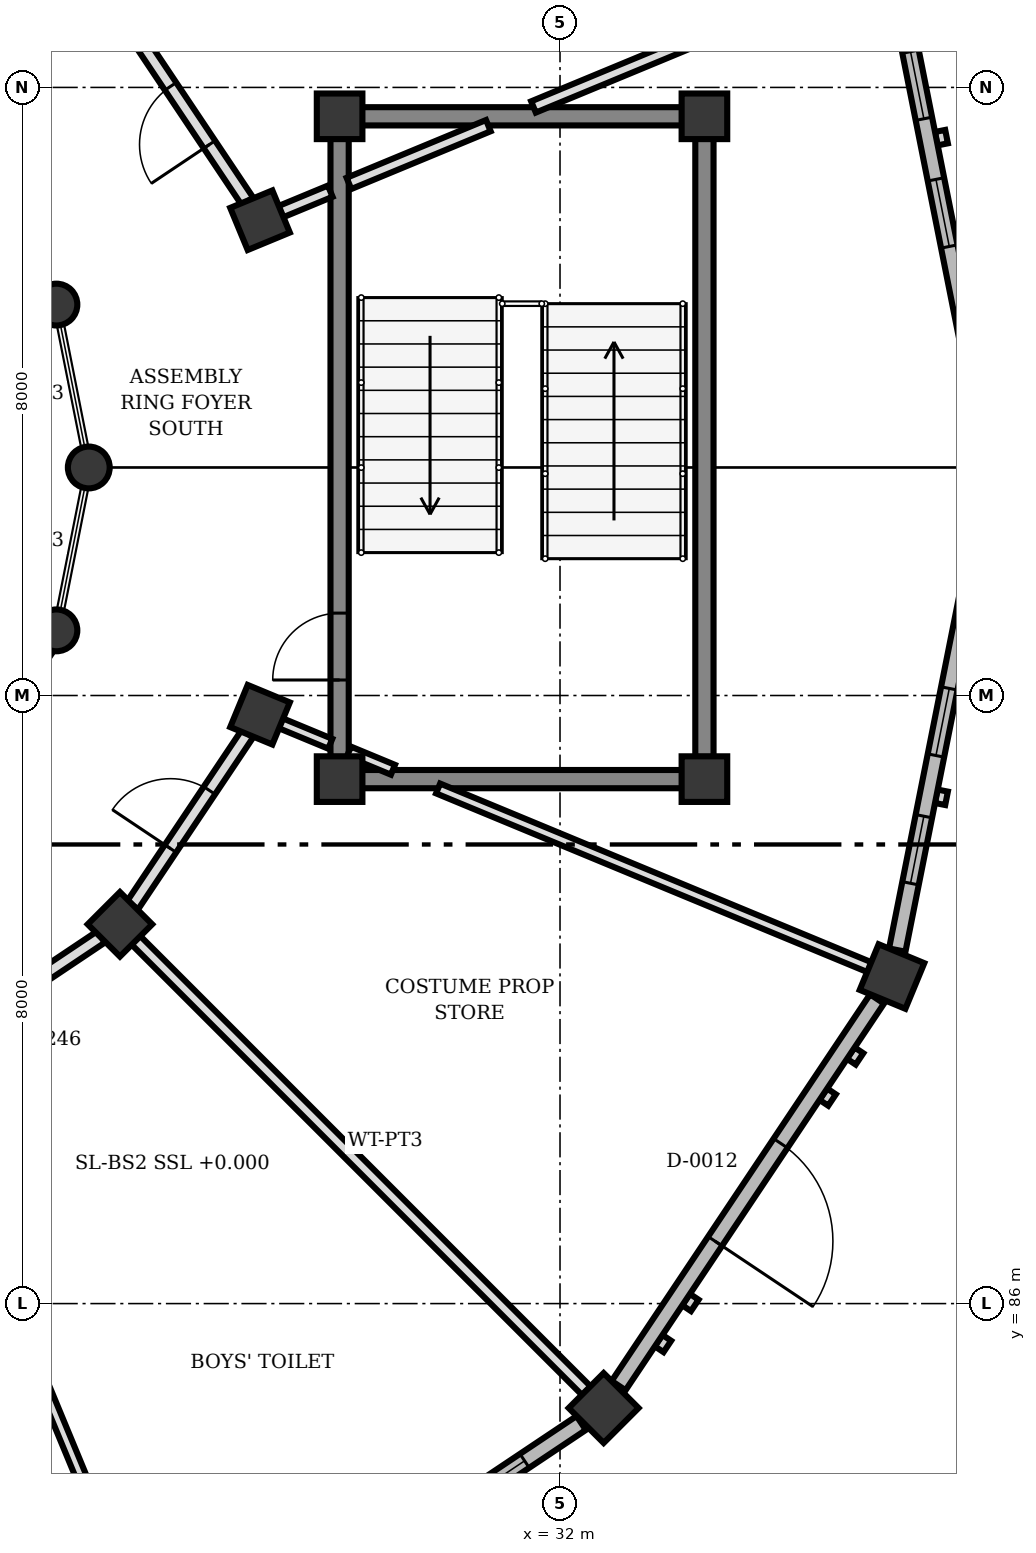
"""IFC4 building model, lengths in metres.
Left out: names, types, materials, properties, quantities, classifications, styles, units other than length and angle.
Written with IfcOpenShell. Run it as: python <this file> out.ifc"""

import sys

from ifc_helpers import new_model, si_unit, direction, frame, frame_2d, origin, origin_2d, place, context, subcontext, project, spatial, rectangle, circle, extrude, element, fill, save


model = new_model("IFC4")
c1 = context("Model", 3, precision=1e-05, world=origin(), true_north=direction((0.0, 1.0)))
c2 = subcontext(c1, "Body", "Model", "MODEL_VIEW")
j1 = project(units=[si_unit("LENGTHUNIT", "METRE"), si_unit("PLANEANGLEUNIT", "RADIAN")], contexts=[c1])
p1 = place(None, origin())
s1 = spatial("IfcSite", under=j1, at=p1, CompositionType="ELEMENT")
p2 = place(p1, origin())
s2 = spatial("IfcBuilding", under=s1, at=p2, CompositionType="ELEMENT")
p3 = place(p2, origin())
s3 = spatial("IfcBuildingStorey", under=s2, at=p3, CompositionType="ELEMENT", Elevation=0.0)
for number, where, z_axis, x_axis in (
    (1, (29.1, 92.9, 0.0), (0.0, 0.0, 1.0), (1.0, 0.0, 0.0)),
    (2, (33.9, 92.9, 0.0), (0.0, 0.0, 1.0), (1.0, 0.0, 0.0)),
    (3, (33.9, 101.62, 0.0), (0.0, 0.0, 1.0), (1.0, 0.0, 0.0)),
    (4, (29.1, 101.62, 0.0), (0.0, 0.0, 1.0), (1.0, 0.0, 0.0)),
):
    element("IfcColumn", number, at=place(p3, frame(where, z_axis=z_axis, x_axis=x_axis)), inside=s3, PredefinedType="COLUMN", context=c2, shape_type="SweptSolid", body=[
        extrude(rectangle(XDim=0.6, YDim=0.6, at=origin_2d()), origin(), (0.0, 0.0, 1.0), 4.5),
    ])
for number, where, z_axis, x_axis in (
    (5, (25.8, 97.0, 0.0), (0.0, 0.0, 1.0), (1.0, 0.0, 0.0)),
    (6, (25.374, 99.143, 0.0), (0.0, 0.0, 1.0), (1.0, 0.0, 0.0)),
    (7, (25.374, 94.857, 0.0), (0.0, 0.0, 1.0), (1.0, 0.0, 0.0)),
):
    element("IfcColumn", number, at=place(p3, frame(where, z_axis=z_axis, x_axis=x_axis)), inside=s3, PredefinedType="COLUMN", context=c2, shape_type="SweptSolid", body=[
        extrude(circle(Radius=0.275, at=origin_2d()), origin(), (0.0, 0.0, 1.0), 4.5),
    ])
for number, where, z_axis, x_axis in (
    (8, (28.053, 100.253, 0.0), (0.0, 0.0, 1.0), (0.924, 0.383, 0.0)),
    (9, (26.21, 90.99, 0.0), (0.0, 0.0, 1.0), (0.707, -0.707, 0.0)),
    (10, (28.053, 93.747, 0.0), (0.0, 0.0, 1.0), (0.924, -0.383, 0.0)),
):
    element("IfcColumn", number, at=place(p3, frame(where, z_axis=z_axis, x_axis=x_axis)), inside=s3, PredefinedType="COLUMN", context=c2, shape_type="SweptSolid", body=[
        extrude(rectangle(XDim=0.6, YDim=0.6, at=origin_2d()), origin(), (0.0, 0.0, 1.0), 4.5),
    ])
for number, where, z_axis, x_axis in (
    (11, (32.574, 84.626, 0.0), (0.0, 0.0, 1.0), (0.707, -0.707, 0.0)),
    (12, (36.368, 90.303, 0.0), (0.0, 0.0, 1.0), (0.924, -0.383, 0.0)),
):
    element("IfcColumn", number, at=place(p3, frame(where, z_axis=z_axis, x_axis=x_axis)), inside=s3, PredefinedType="COLUMN", context=c2, shape_type="SweptSolid", body=[
        extrude(rectangle(XDim=0.65, YDim=0.65, at=origin_2d()), origin(), (0.0, 0.0, 1.0), 4.5),
    ])
p4 = place(p3, frame((36.437, 103.349, 0.0), z_axis=(0.0, 0.0, 1.0), x_axis=(0.195149240347, -0.980773558979, 0.0)))
e13 = element("IfcWall", 13, at=p4, inside=s3, PredefinedType="SOLIDWALL", context=c2, shape_type="SweptSolid", body=[
    extrude(rectangle(XDim=6.119, YDim=0.22, at=frame_2d((3.06, 0.0))), origin(), (0.0, 0.0, 1.0), 3.55),
])
p5 = place(p4, frame((0.896, 0.0, 0.85)))
e14 = element("IfcOpeningElement", 14, at=p5, cuts=e13, PredefinedType="OPENING", context=c2, shape_type="SweptSolid", body=[
    extrude(rectangle(XDim=0.9, YDim=1.4, at=frame_2d((0.45, 0.7))), frame((0.0, 0.12, 0.0), z_axis=(0.0, -1.0, 0.0), x_axis=(1.0, 0.0, 0.0)), (0.0, 0.0, 1.0), 0.24),
])
p6 = place(p4, frame((2.609, 0.0, 0.85)))
e15 = element("IfcOpeningElement", 15, at=p6, cuts=e13, PredefinedType="OPENING", context=c2, shape_type="SweptSolid", body=[
    extrude(rectangle(XDim=0.9, YDim=1.4, at=frame_2d((0.45, 0.7))), frame((0.0, 0.12, 0.0), z_axis=(0.0, -1.0, 0.0), x_axis=(1.0, 0.0, 0.0)), (0.0, 0.0, 1.0), 0.24),
])
p7 = place(p4, frame((4.323, 0.0, 0.85)))
e16 = element("IfcOpeningElement", 16, at=p7, cuts=e13, PredefinedType="OPENING", context=c2, shape_type="SweptSolid", body=[
    extrude(rectangle(XDim=0.9, YDim=1.4, at=frame_2d((0.45, 0.7))), frame((0.0, 0.12, 0.0), z_axis=(0.0, -1.0, 0.0), x_axis=(1.0, 0.0, 0.0)), (0.0, 0.0, 1.0), 0.24),
])
p8 = place(p3, frame((32.279, 84.429, 0.0), z_axis=(0.0, 0.0, 1.0), x_axis=(-0.831411331728, -0.555657446161, 0.0)))
e17 = element("IfcWall", 17, at=p8, inside=s3, PredefinedType="SOLIDWALL", context=c2, shape_type="SweptSolid", body=[
    extrude(rectangle(XDim=6.119, YDim=0.22, at=frame_2d((3.059, 0.0))), origin(), (0.0, 0.0, 1.0), 3.55),
])
p9 = place(p8, frame((0.896, 0.0, 0.85)))
e18 = element("IfcOpeningElement", 18, at=p9, cuts=e17, PredefinedType="OPENING", context=c2, shape_type="SweptSolid", body=[
    extrude(rectangle(XDim=0.9, YDim=1.4, at=frame_2d((0.45, 0.7))), frame((0.0, 0.12, 0.0), z_axis=(0.0, -1.0, 0.0), x_axis=(1.0, 0.0, 0.0)), (0.0, 0.0, 1.0), 0.24),
])
p10 = place(p8, frame((2.609, 0.0, 0.85)))
e19 = element("IfcOpeningElement", 19, at=p10, cuts=e17, PredefinedType="OPENING", context=c2, shape_type="SweptSolid", body=[
    extrude(rectangle(XDim=0.9, YDim=1.4, at=frame_2d((0.45, 0.7))), frame((0.0, 0.12, 0.0), z_axis=(0.0, -1.0, 0.0), x_axis=(1.0, 0.0, 0.0)), (0.0, 0.0, 1.0), 0.24),
])
p11 = place(p8, frame((4.323, 0.0, 0.85)))
e20 = element("IfcOpeningElement", 20, at=p11, cuts=e17, PredefinedType="OPENING", context=c2, shape_type="SweptSolid", body=[
    extrude(rectangle(XDim=0.9, YDim=1.4, at=frame_2d((0.45, 0.7))), frame((0.0, 0.12, 0.0), z_axis=(0.0, -1.0, 0.0), x_axis=(1.0, 0.0, 0.0)), (0.0, 0.0, 1.0), 0.24),
])
p12 = place(p3, frame((36.171, 90.008, 0.0), z_axis=(0.0, 0.0, 1.0), x_axis=(-0.555657446161, -0.831411331728, 0.0)))
e21 = element("IfcWall", 21, at=p12, inside=s3, PredefinedType="SOLIDWALL", context=c2, shape_type="SweptSolid", body=[
    extrude(rectangle(XDim=6.119, YDim=0.22, at=frame_2d((3.059, 0.0))), origin(), (0.0, 0.0, 1.0), 3.55),
])
p13 = place(p12, frame((2.284, 0.0, 0.0)))
e22 = element("IfcOpeningElement", 22, at=p13, cuts=e21, PredefinedType="OPENING", context=c2, shape_type="SweptSolid", body=[
    extrude(rectangle(XDim=1.55, YDim=2.2, at=frame_2d((0.775, 1.1))), frame((0.0, 0.12, 0.0), z_axis=(0.0, -1.0, 0.0), x_axis=(1.0, 0.0, 0.0)), (0.0, 0.0, 1.0), 0.24),
])
p14 = place(p3, frame((37.631, 96.652, 0.0), z_axis=(0.0, 0.0, 1.0), x_axis=(-0.195149240347, -0.980773558979, 0.0)))
e23 = element("IfcWall", 23, at=p14, inside=s3, PredefinedType="SOLIDWALL", context=c2, shape_type="SweptSolid", body=[
    extrude(rectangle(XDim=6.119, YDim=0.22, at=frame_2d((3.06, 0.0))), origin(), (0.0, 0.0, 1.0), 3.55),
])
p15 = place(p14, frame((0.896, 0.0, 0.85)))
e24 = element("IfcOpeningElement", 24, at=p15, cuts=e23, PredefinedType="OPENING", context=c2, shape_type="SweptSolid", body=[
    extrude(rectangle(XDim=0.9, YDim=1.4, at=frame_2d((0.45, 0.7))), frame((0.0, 0.12, 0.0), z_axis=(0.0, -1.0, 0.0), x_axis=(1.0, 0.0, 0.0)), (0.0, 0.0, 1.0), 0.24),
])
p16 = place(p14, frame((2.609, 0.0, 0.85)))
e25 = element("IfcOpeningElement", 25, at=p16, cuts=e23, PredefinedType="OPENING", context=c2, shape_type="SweptSolid", body=[
    extrude(rectangle(XDim=0.9, YDim=1.4, at=frame_2d((0.45, 0.7))), frame((0.0, 0.12, 0.0), z_axis=(0.0, -1.0, 0.0), x_axis=(1.0, 0.0, 0.0)), (0.0, 0.0, 1.0), 0.24),
])
p17 = place(p14, frame((4.323, 0.0, 0.85)))
e26 = element("IfcOpeningElement", 26, at=p17, cuts=e23, PredefinedType="OPENING", context=c2, shape_type="SweptSolid", body=[
    extrude(rectangle(XDim=0.9, YDim=1.4, at=frame_2d((0.45, 0.7))), frame((0.0, 0.12, 0.0), z_axis=(0.0, -1.0, 0.0), x_axis=(1.0, 0.0, 0.0)), (0.0, 0.0, 1.0), 0.24),
])
p18 = place(p3, frame((29.1, 93.192, 0.0), z_axis=(0.0, 0.0, 1.0), x_axis=(0.0, 1.0, 0.0)))
e27 = element("IfcWall", 27, at=p18, inside=s3, PredefinedType="SHEAR", context=c2, shape_type="SweptSolid", body=[
    extrude(rectangle(XDim=8.136, YDim=0.24, at=frame_2d((4.068, 0.0))), origin(), (0.0, 0.0, 1.0), 4.24),
])
p19 = place(p18, frame((1.012, 0.0, 0.0)))
e28 = element("IfcOpeningElement", 28, at=p19, cuts=e27, PredefinedType="OPENING", context=c2, shape_type="SweptSolid", body=[
    extrude(rectangle(XDim=0.88, YDim=2.1, at=frame_2d((0.44, 1.05))), frame((0.0, 0.13, 0.0), z_axis=(0.0, -1.0, 0.0), x_axis=(1.0, 0.0, 0.0)), (0.0, 0.0, 1.0), 0.26),
])
p20 = place(p3, frame((33.9, 101.328, 0.0), z_axis=(0.0, 0.0, 1.0), x_axis=(0.0, -1.0, 0.0)))
e29 = element("IfcWall", 29, at=p20, inside=s3, PredefinedType="SHEAR", context=c2, shape_type="SweptSolid", body=[
    extrude(rectangle(XDim=8.136, YDim=0.24, at=frame_2d((4.068, 0.0))), origin(), (0.0, 0.0, 1.0), 4.24),
])
for number, where, z_axis, x_axis in (
    (30, (33.608, 92.9, 0.0), (0.0, 0.0, 1.0), (-1.0, 0.0, 0.0)),
    (31, (33.608, 101.62, 0.0), (0.0, 0.0, 1.0), (-1.0, 0.0, 0.0)),
):
    element("IfcWall", number, at=place(p3, frame(where, z_axis=z_axis, x_axis=x_axis)), inside=s3, PredefinedType="SHEAR", context=c2, shape_type="SweptSolid", body=[
        extrude(rectangle(XDim=4.216, YDim=0.24, at=frame_2d((2.108, 0.0))), origin(), (0.0, 0.0, 1.0), 4.24),
    ])
p21 = place(p3, frame((28.323, 100.364, 0.0), z_axis=(0.0, 0.0, 1.0), x_axis=(0.923840285319, 0.382778169729, 0.0)))
e32 = element("IfcWall", 32, at=p21, inside=s3, PredefinedType="PARTITIONING", context=c2, shape_type="SweptSolid", body=[
    extrude(rectangle(XDim=0.708, YDim=0.16, at=frame_2d((0.354, 0.0))), origin(), (0.0, 0.0, 1.0), 4.2),
])
p22 = place(p3, frame((29.223, 100.737, 0.0), z_axis=(0.0, 0.0, 1.0), x_axis=(0.923817443679, 0.382833293686, 0.0)))
e33 = element("IfcWall", 33, at=p22, inside=s3, PredefinedType="PARTITIONING", context=c2, shape_type="SweptSolid", body=[
    extrude(rectangle(XDim=1.985, YDim=0.16, at=frame_2d((0.993, 0.0))), origin(), (0.0, 0.0, 1.0), 4.2),
])
p23 = place(p3, frame((31.651, 101.743, 0.0), z_axis=(0.0, 0.0, 1.0), x_axis=(0.923842829076, 0.38277203028, 0.0)))
e34 = element("IfcWall", 34, at=p23, inside=s3, PredefinedType="PARTITIONING", context=c2, shape_type="SweptSolid", body=[
    extrude(rectangle(XDim=4.789, YDim=0.16, at=frame_2d((2.395, 0.0))), origin(), (0.0, 0.0, 1.0), 4.2),
])
p24 = place(p3, frame((24.303, 87.094, 0.0), z_axis=(0.0, 0.0, 1.0), x_axis=(0.382744474407, -0.923854245707, 0.0)))
e35 = element("IfcWall", 35, at=p24, inside=s3, PredefinedType="PARTITIONING", context=c2, shape_type="SweptSolid", body=[
    extrude(rectangle(XDim=6.461, YDim=0.14, at=frame_2d((3.23, 0.0))), origin(), (0.0, 0.0, 1.0), 3.552),
])
p25 = place(p3, frame((26.416, 90.784, 0.0), z_axis=(0.0, 0.0, 1.0), x_axis=(0.707121327267, -0.707092234807, 0.0)))
e36 = element("IfcWall", 36, at=p25, inside=s3, PredefinedType="PARTITIONING", context=c2, shape_type="SweptSolid", body=[
    extrude(rectangle(XDim=8.392, YDim=0.16, at=frame_2d((4.196, 0.0))), origin(), (0.0, 0.0, 1.0), 3.552),
])
p26 = place(p3, frame((28.323, 93.636, 0.0), z_axis=(0.0, 0.0, 1.0), x_axis=(0.923840285319, -0.382778169729, 0.0)))
e37 = element("IfcWall", 37, at=p26, inside=s3, PredefinedType="PARTITIONING", context=c2, shape_type="SweptSolid", body=[
    extrude(rectangle(XDim=0.708, YDim=0.14, at=frame_2d((0.354, 0.0))), origin(), (0.0, 0.0, 1.0), 3.552),
])
p27 = place(p3, frame((29.223, 93.263, 0.0), z_axis=(0.0, 0.0, 1.0), x_axis=(0.923812676193, -0.382844797933, 0.0)))
e38 = element("IfcWall", 38, at=p27, inside=s3, PredefinedType="PARTITIONING", context=c2, shape_type="SweptSolid", body=[
    extrude(rectangle(XDim=0.627, YDim=0.14, at=frame_2d((0.313, 0.0))), origin(), (0.0, 0.0, 1.0), 3.552),
])
p28 = place(p3, frame((30.396, 92.777, 0.0), z_axis=(0.0, 0.0, 1.0), x_axis=(0.923837705987, -0.382784394923, 0.0)))
e39 = element("IfcWall", 39, at=p28, inside=s3, PredefinedType="PARTITIONING", context=c2, shape_type="SweptSolid", body=[
    extrude(rectangle(XDim=6.147, YDim=0.14, at=frame_2d((3.074, 0.0))), origin(), (0.0, 0.0, 1.0), 3.552),
])
p29 = place(p3, frame((27.888, 100.501, 0.0), z_axis=(0.0, 0.0, 1.0), x_axis=(-0.556128339679, 0.831096426298, 0.0)))
e40 = element("IfcWall", 40, at=p29, inside=s3, PredefinedType="PARTITIONING", context=c2, shape_type="SweptSolid", body=[
    extrude(rectangle(XDim=2.72, YDim=0.18, at=frame_2d((1.36, 0.0))), origin(), (0.0, 0.0, 1.0), 3.552),
])
p30 = place(p29, frame((0.9, 0.0, 0.0)))
e41 = element("IfcOpeningElement", 41, at=p30, cuts=e40, PredefinedType="OPENING", context=c2, shape_type="SweptSolid", body=[
    extrude(rectangle(XDim=0.92, YDim=2.1, at=frame_2d((0.46, 1.05))), frame((0.0, 0.1, 0.0), z_axis=(0.0, -1.0, 0.0), x_axis=(1.0, 0.0, 0.0)), (0.0, 0.0, 1.0), 0.2),
])
p31 = place(p3, frame((23.701, 89.312, 0.0), z_axis=(0.0, 0.0, 1.0), x_axis=(0.831096426298, 0.556128339679, 0.0)))
e42 = element("IfcWall", 42, at=p31, inside=s3, PredefinedType="PARTITIONING", context=c2, shape_type="SweptSolid", body=[
    extrude(rectangle(XDim=2.72, YDim=0.18, at=frame_2d((1.36, 0.0))), origin(), (0.0, 0.0, 1.0), 3.552),
])
p32 = place(p31, frame((0.9, 0.0, 0.0)))
e43 = element("IfcOpeningElement", 43, at=p32, cuts=e42, PredefinedType="OPENING", context=c2, shape_type="SweptSolid", body=[
    extrude(rectangle(XDim=0.92, YDim=2.1, at=frame_2d((0.46, 1.05))), frame((0.0, 0.1, 0.0), z_axis=(0.0, -1.0, 0.0), x_axis=(1.0, 0.0, 0.0)), (0.0, 0.0, 1.0), 0.2),
])
p33 = place(p3, frame((26.375, 91.238, 0.0), z_axis=(0.0, 0.0, 1.0), x_axis=(0.556128339679, 0.831096426298, 0.0)))
e44 = element("IfcWall", 44, at=p33, inside=s3, PredefinedType="PARTITIONING", context=c2, shape_type="SweptSolid", body=[
    extrude(rectangle(XDim=2.72, YDim=0.18, at=frame_2d((1.36, 0.0))), origin(), (0.0, 0.0, 1.0), 3.552),
])
p34 = place(p33, frame((0.9, 0.0, 0.0)))
e45 = element("IfcOpeningElement", 45, at=p34, cuts=e44, PredefinedType="OPENING", context=c2, shape_type="SweptSolid", body=[
    extrude(rectangle(XDim=0.92, YDim=2.1, at=frame_2d((0.46, 1.05))), frame((0.0, 0.1, 0.0), z_axis=(0.0, -1.0, 0.0), x_axis=(1.0, 0.0, 0.0)), (0.0, 0.0, 1.0), 0.2),
])
p35 = place(p5, origin())
e46 = element("IfcWindow", 46, at=p35, inside=s3, PartitioningType="SINGLE_PANEL", PredefinedType="WINDOW", context=c2, shape_type="SweptSolid", body=[
    extrude(rectangle(XDim=0.9, YDim=1.4, at=frame_2d((0.45, 0.7))), frame((0.0, 0.03, 0.0), z_axis=(0.0, -1.0, 0.0), x_axis=(1.0, 0.0, 0.0)), (0.0, 0.0, 1.0), 0.06),
])
fill(e14, e46)
p36 = place(p6, origin())
e47 = element("IfcWindow", 47, at=p36, inside=s3, PartitioningType="SINGLE_PANEL", PredefinedType="WINDOW", context=c2, shape_type="SweptSolid", body=[
    extrude(rectangle(XDim=0.9, YDim=1.4, at=frame_2d((0.45, 0.7))), frame((0.0, 0.03, 0.0), z_axis=(0.0, -1.0, 0.0), x_axis=(1.0, 0.0, 0.0)), (0.0, 0.0, 1.0), 0.06),
])
fill(e15, e47)
p37 = place(p9, origin())
e48 = element("IfcWindow", 48, at=p37, inside=s3, PartitioningType="SINGLE_PANEL", PredefinedType="WINDOW", context=c2, shape_type="SweptSolid", body=[
    extrude(rectangle(XDim=0.9, YDim=1.4, at=frame_2d((0.45, 0.7))), frame((0.0, 0.03, 0.0), z_axis=(0.0, -1.0, 0.0), x_axis=(1.0, 0.0, 0.0)), (0.0, 0.0, 1.0), 0.06),
])
fill(e18, e48)
p38 = place(p13, origin())
e49 = element("IfcDoor", 49, at=p38, inside=s3, OperationType="SINGLE_SWING_RIGHT", PredefinedType="DOOR", context=c2, shape_type="SweptSolid", body=[
    extrude(rectangle(XDim=1.55, YDim=2.2, at=frame_2d((0.775, 1.1))), frame((0.0, 0.025, 0.0), z_axis=(0.0, -1.0, 0.0), x_axis=(1.0, 0.0, 0.0)), (0.0, 0.0, 1.0), 0.05),
])
fill(e22, e49)
p39 = place(p16, origin())
e50 = element("IfcWindow", 50, at=p39, inside=s3, PartitioningType="SINGLE_PANEL", PredefinedType="WINDOW", context=c2, shape_type="SweptSolid", body=[
    extrude(rectangle(XDim=0.9, YDim=1.4, at=frame_2d((0.45, 0.7))), frame((0.0, 0.03, 0.0), z_axis=(0.0, -1.0, 0.0), x_axis=(1.0, 0.0, 0.0)), (0.0, 0.0, 1.0), 0.06),
])
fill(e25, e50)
p40 = place(p17, origin())
e51 = element("IfcWindow", 51, at=p40, inside=s3, PartitioningType="SINGLE_PANEL", PredefinedType="WINDOW", context=c2, shape_type="SweptSolid", body=[
    extrude(rectangle(XDim=0.9, YDim=1.4, at=frame_2d((0.45, 0.7))), frame((0.0, 0.03, 0.0), z_axis=(0.0, -1.0, 0.0), x_axis=(1.0, 0.0, 0.0)), (0.0, 0.0, 1.0), 0.06),
])
fill(e26, e51)
p41 = place(p19, origin())
e52 = element("IfcDoor", 52, at=p41, inside=s3, OperationType="SINGLE_SWING_LEFT", PredefinedType="DOOR", context=c2, shape_type="SweptSolid", body=[
    extrude(rectangle(XDim=0.88, YDim=2.1, at=frame_2d((0.44, 1.05))), frame((0.0, 0.025, 0.0), z_axis=(0.0, -1.0, 0.0), x_axis=(1.0, 0.0, 0.0)), (0.0, 0.0, 1.0), 0.05),
])
fill(e28, e52)
p42 = place(p30, origin())
e53 = element("IfcDoor", 53, at=p42, inside=s3, OperationType="SINGLE_SWING_LEFT", PredefinedType="DOOR", context=c2, shape_type="SweptSolid", body=[
    extrude(rectangle(XDim=0.92, YDim=2.1, at=frame_2d((0.46, 1.05))), frame((0.0, 0.025, 0.0), z_axis=(0.0, -1.0, 0.0), x_axis=(1.0, 0.0, 0.0)), (0.0, 0.0, 1.0), 0.05),
])
fill(e41, e53)
p43 = place(p34, origin())
e54 = element("IfcDoor", 54, at=p43, inside=s3, OperationType="SINGLE_SWING_LEFT", PredefinedType="DOOR", context=c2, shape_type="SweptSolid", body=[
    extrude(rectangle(XDim=0.92, YDim=2.1, at=frame_2d((0.46, 1.05))), frame((0.0, 0.025, 0.0), z_axis=(0.0, -1.0, 0.0), x_axis=(1.0, 0.0, 0.0)), (0.0, 0.0, 1.0), 0.05),
])
fill(e45, e54)
save(model, sys.argv[1])
